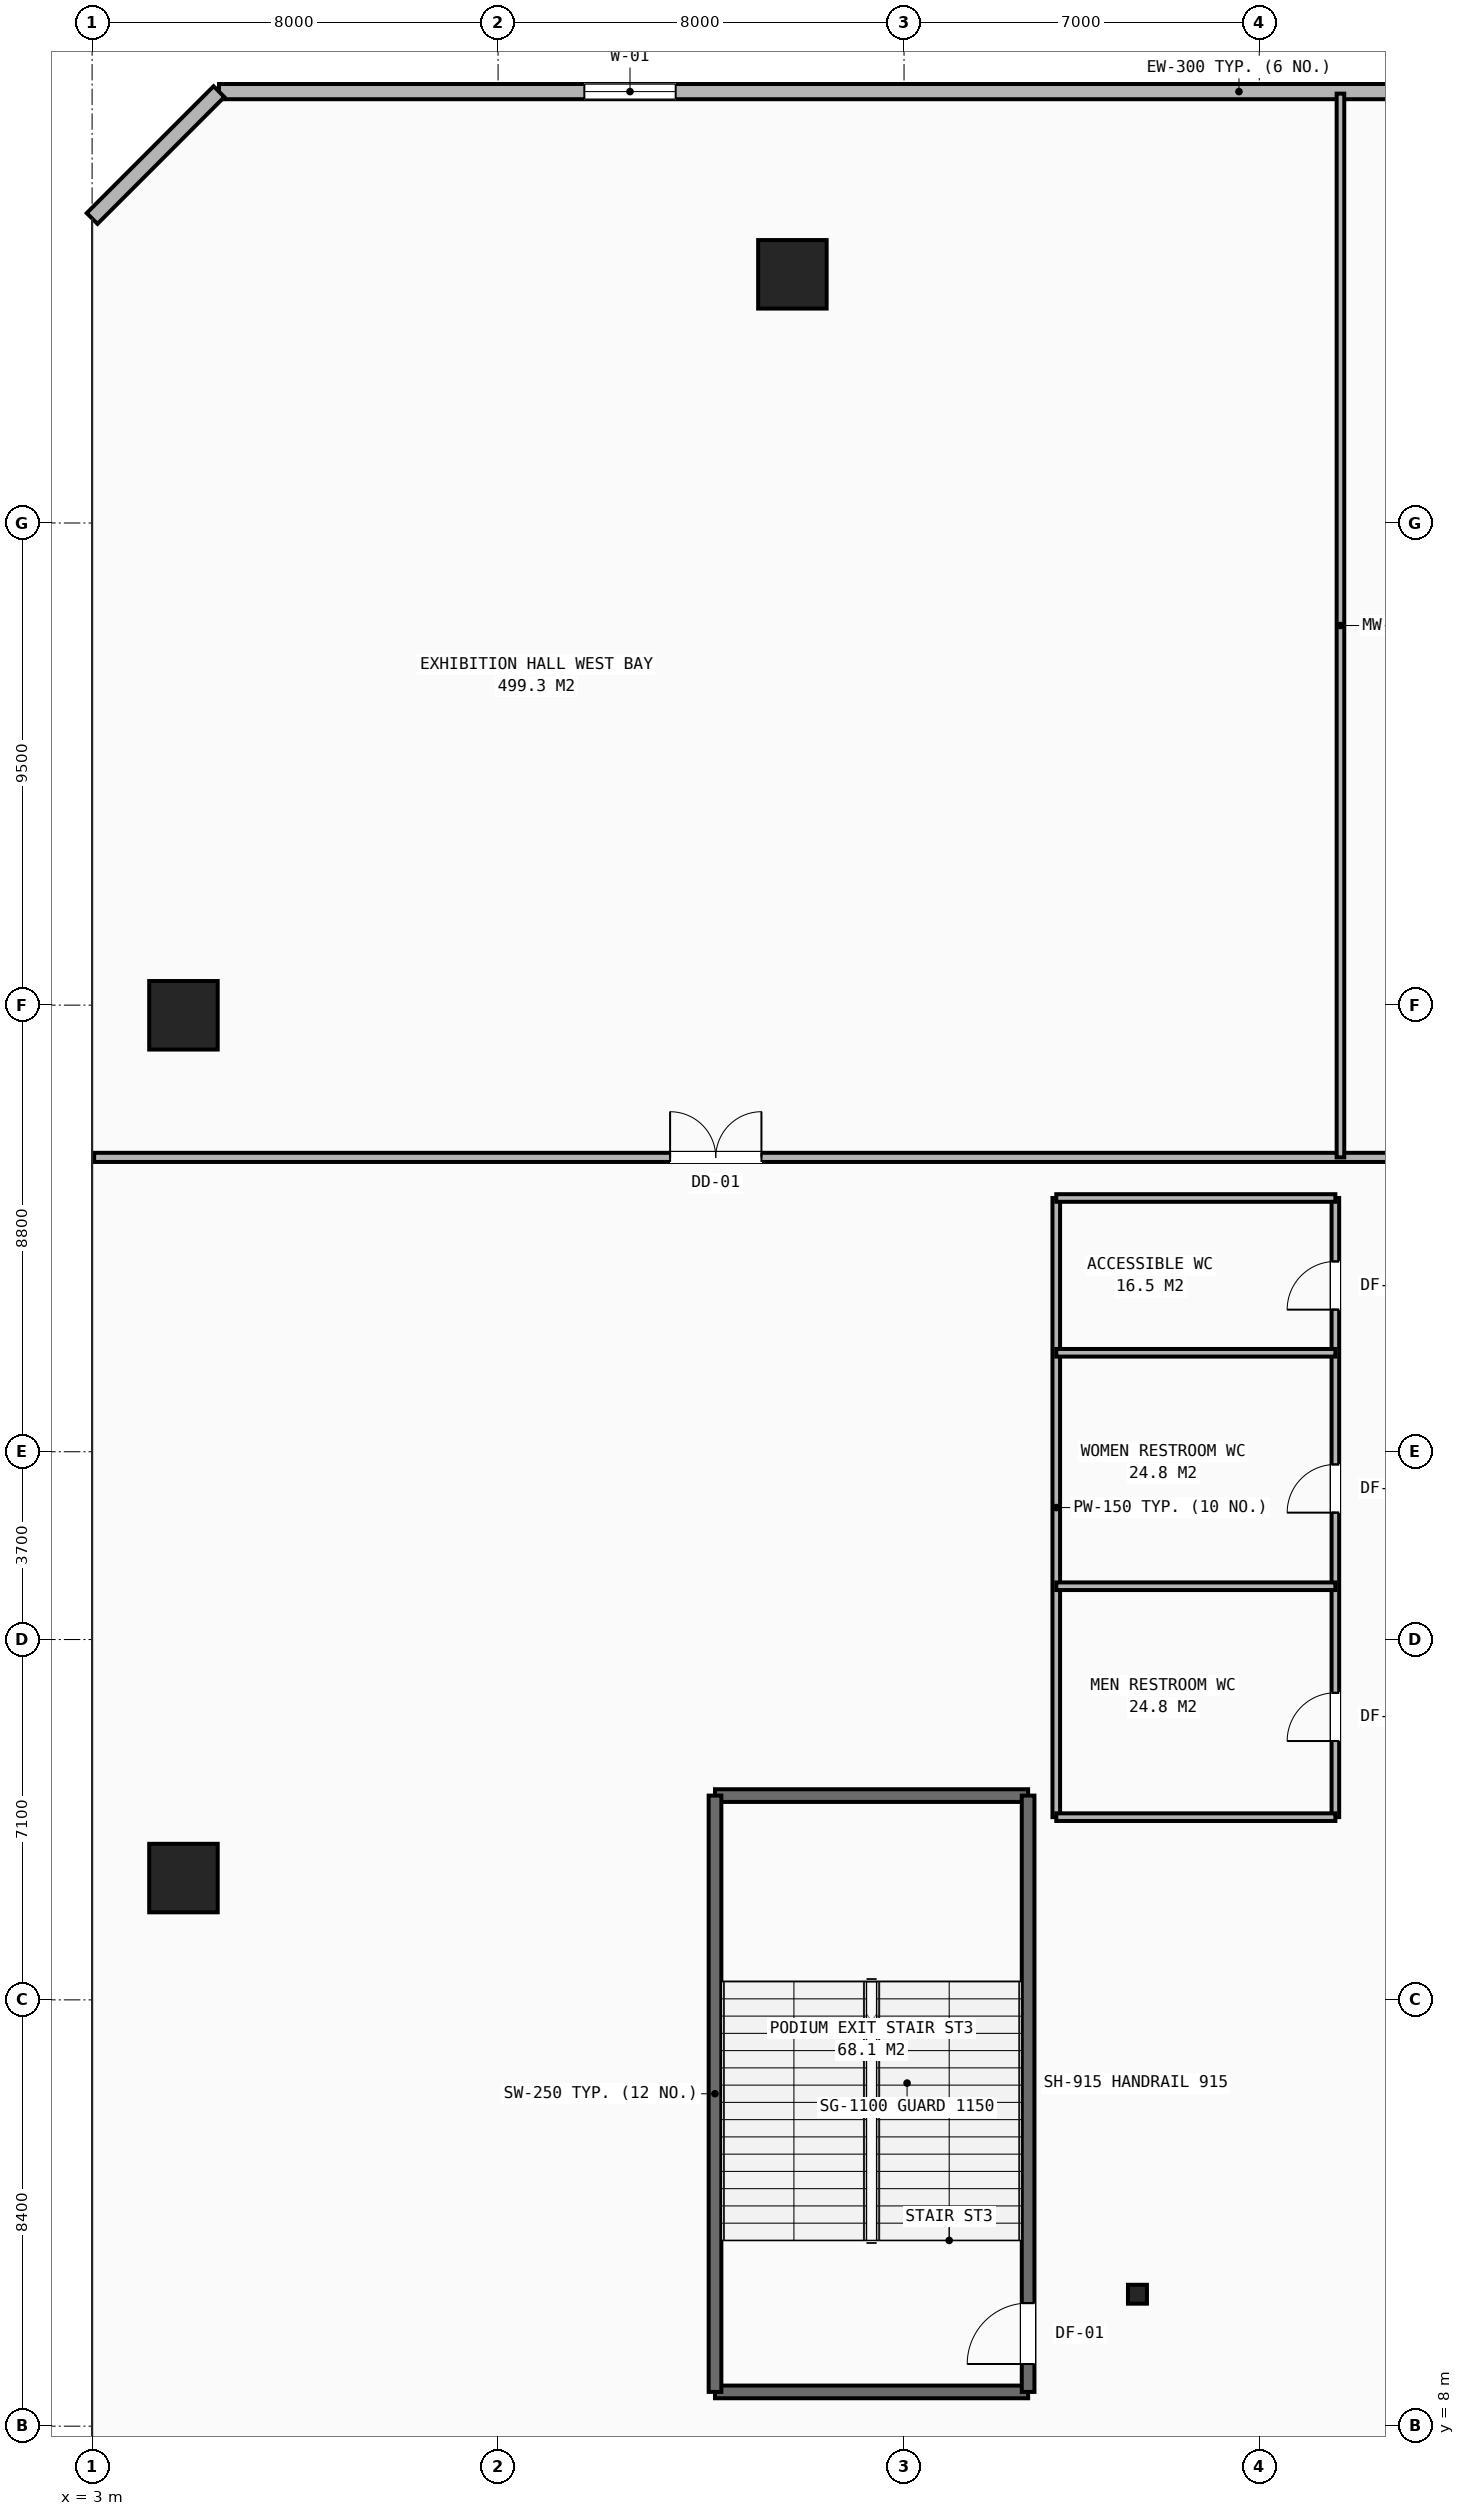
"""IFC4 building model, lengths in metres.
Left out: names, types, materials, properties, quantities, classifications, styles, units other than length and angle.
Written with IfcOpenShell. Run it as: python <this file> out.ifc"""

import sys

from ifc_helpers import new_model, si_unit, direction, frame, frame_2d, origin, origin_2d, place, context, subcontext, project, spatial, rectangle, hollow_rectangle, i_section, extrude, element, fill, save


model = new_model("IFC4")
c1 = context("Model", 3, precision=1e-05, world=origin(), true_north=direction((0.0, 1.0)))
c2 = subcontext(c1, "Body", "Model", "MODEL_VIEW")
j1 = project(units=[si_unit("LENGTHUNIT", "METRE"), si_unit("PLANEANGLEUNIT", "RADIAN")], contexts=[c1])
p1 = place(None, origin())
s1 = spatial("IfcSite", under=j1, at=p1, CompositionType="ELEMENT")
p2 = place(p1, origin())
s2 = spatial("IfcBuilding", under=s1, at=p2, CompositionType="ELEMENT")
p3 = place(p2, frame((0.0, 0.0, 11.0)))
s3 = spatial("IfcBuildingStorey", under=s2, at=p3, CompositionType="ELEMENT", Elevation=11.0)
p4 = place(p3, frame((23.6, 10.6, 0.0), z_axis=(0.0, 0.0, 1.0), x_axis=(1.0, 0.0, 0.0)))
e1 = element("IfcColumn", 1, at=p4, inside=s3, PredefinedType="COLUMN", context=c2, shape_type="SweptSolid", body=[
    extrude(i_section(OverallWidth=0.374, OverallDepth=0.372, WebThickness=0.016, FlangeThickness=0.026, at=origin_2d()), origin(), (0.0, 0.0, 1.0), 5.5),
])
for number, where, z_axis, x_axis in (
    (2, (4.8, 18.8, 0.0), (0.0, 0.0, 1.0), (1.0, 0.0, 0.0)),
    (3, (4.8, 35.8, 0.0), (0.0, 0.0, 1.0), (1.0, 0.0, 0.0)),
    (4, (16.8, 50.4, 0.0), (0.0, 0.0, 1.0), (1.0, 0.0, 0.0)),
):
    element("IfcColumn", number, at=place(p3, frame(where, z_axis=z_axis, x_axis=x_axis)), inside=s3, PredefinedType="COLUMN", context=c2, shape_type="SweptSolid", body=[
        extrude(hollow_rectangle(XDim=1.35, YDim=1.35, WallThickness=0.085, at=origin_2d()), origin(), (0.0, 0.0, 1.0), 5.5),
    ])
p5 = place(p3, frame((74.5, 54.0, 0.0), z_axis=(0.0, 0.0, 1.0), x_axis=(-1.0, 0.0, 0.0)))
e5 = element("IfcWall", 5, at=p5, inside=s3, PredefinedType="STANDARD", context=c2, shape_type="SweptSolid", body=[
    extrude(rectangle(XDim=69.0, YDim=0.3, at=frame_2d((34.5, 0.0))), origin(), (0.0, 0.0, 1.0), 5.18),
])
p6 = place(p5, frame((8.0, 0.0, 1.1)))
e6 = element("IfcOpeningElement", 6, at=p6, cuts=e5, PredefinedType="OPENING", context=c2, shape_type="SweptSolid", body=[
    extrude(rectangle(XDim=1.8, YDim=2.1, at=frame_2d((0.9, 1.05))), frame((0.0, 0.16, 0.0), z_axis=(0.0, -1.0, 0.0), x_axis=(1.0, 0.0, 0.0)), (0.0, 0.0, 1.0), 0.32),
])
p7 = place(p5, frame((16.0, 0.0, 1.1)))
e7 = element("IfcOpeningElement", 7, at=p7, cuts=e5, PredefinedType="OPENING", context=c2, shape_type="SweptSolid", body=[
    extrude(rectangle(XDim=1.8, YDim=2.1, at=frame_2d((0.9, 1.05))), frame((0.0, 0.16, 0.0), z_axis=(0.0, -1.0, 0.0), x_axis=(1.0, 0.0, 0.0)), (0.0, 0.0, 1.0), 0.32),
])
p8 = place(p5, frame((36.0, 0.0, 1.1)))
e8 = element("IfcOpeningElement", 8, at=p8, cuts=e5, PredefinedType="OPENING", context=c2, shape_type="SweptSolid", body=[
    extrude(rectangle(XDim=1.8, YDim=2.1, at=frame_2d((0.9, 1.05))), frame((0.0, 0.16, 0.0), z_axis=(0.0, -1.0, 0.0), x_axis=(1.0, 0.0, 0.0)), (0.0, 0.0, 1.0), 0.32),
])
p9 = place(p5, frame((60.0, 0.0, 1.1)))
e9 = element("IfcOpeningElement", 9, at=p9, cuts=e5, PredefinedType="OPENING", context=c2, shape_type="SweptSolid", body=[
    extrude(rectangle(XDim=1.8, YDim=2.1, at=frame_2d((0.9, 1.05))), frame((0.0, 0.16, 0.0), z_axis=(0.0, -1.0, 0.0), x_axis=(1.0, 0.0, 0.0)), (0.0, 0.0, 1.0), 0.32),
])
p10 = place(p3, frame((5.5, 54.0, 0.0), z_axis=(0.0, 0.0, 1.0), x_axis=(-0.707106781187, -0.707106781187, 0.0)))
e10 = element("IfcWall", 10, at=p10, inside=s3, PredefinedType="STANDARD", context=c2, shape_type="SweptSolid", body=[
    extrude(rectangle(XDim=3.536, YDim=0.3, at=frame_2d((1.768, 0.0))), origin(), (0.0, 0.0, 1.0), 5.18),
])
for number, where, z_axis, x_axis in (
    (11, (15.275, 20.425, 0.0), (0.0, 0.0, 1.0), (1.0, 0.0, 0.0)),
    (12, (15.275, 8.675, 0.0), (0.0, 0.0, 1.0), (1.0, 0.0, 0.0)),
):
    element("IfcWall", number, at=place(p3, frame(where, z_axis=z_axis, x_axis=x_axis)), inside=s3, PredefinedType="SHEAR", context=c2, shape_type="SweptSolid", body=[
        extrude(rectangle(XDim=6.17, YDim=0.25, at=frame_2d((3.085, 0.0))), origin(), (0.0, 0.0, 1.0), 5.18),
    ])
p11 = place(p3, frame((15.275, 8.675, 0.0), z_axis=(0.0, 0.0, 1.0), x_axis=(0.0, 1.0, 0.0)))
e13 = element("IfcWall", 13, at=p11, inside=s3, PredefinedType="SHEAR", context=c2, shape_type="SweptSolid", body=[
    extrude(rectangle(XDim=11.75, YDim=0.25, at=frame_2d((5.875, 0.0))), origin(), (0.0, 0.0, 1.0), 5.18),
])
p12 = place(p3, frame((21.445, 8.675, 0.0), z_axis=(0.0, 0.0, 1.0), x_axis=(0.0, 1.0, 0.0)))
e14 = element("IfcWall", 14, at=p12, inside=s3, PredefinedType="SHEAR", context=c2, shape_type="SweptSolid", body=[
    extrude(rectangle(XDim=11.75, YDim=0.25, at=frame_2d((5.875, 0.0))), origin(), (0.0, 0.0, 1.0), 5.18),
])
p13 = place(p12, frame((0.55, 0.0, 0.0)))
e15 = element("IfcOpeningElement", 15, at=p13, cuts=e14, PredefinedType="OPENING", context=c2, shape_type="SweptSolid", body=[
    extrude(rectangle(XDim=1.2, YDim=2.15, at=frame_2d((0.6, 1.075))), frame((0.0, 0.135, 0.0), z_axis=(0.0, -1.0, 0.0), x_axis=(1.0, 0.0, 0.0)), (0.0, 0.0, 1.0), 0.27),
])
p14 = place(p3, frame((3.04, 33.0, 0.0), z_axis=(0.0, 0.0, 1.0), x_axis=(1.0, 0.0, 0.0)))
e16 = element("IfcWall", 16, at=p14, inside=s3, PredefinedType="PARTITIONING", context=c2, shape_type="SweptSolid", body=[
    extrude(rectangle(XDim=73.92, YDim=0.18, at=frame_2d((36.96, 0.0))), origin(), (0.0, 0.0, 1.0), 4.243),
])
p15 = place(p14, frame((11.35, 0.0, 0.0)))
e17 = element("IfcOpeningElement", 17, at=p15, cuts=e16, PredefinedType="OPENING", context=c2, shape_type="SweptSolid", body=[
    extrude(rectangle(XDim=1.8, YDim=2.4, at=frame_2d((0.9, 1.2))), frame((0.0, 0.1, 0.0), z_axis=(0.0, -1.0, 0.0), x_axis=(1.0, 0.0, 0.0)), (0.0, 0.0, 1.0), 0.2),
])
p16 = place(p14, frame((35.95, 0.0, 0.0)))
e18 = element("IfcOpeningElement", 18, at=p16, cuts=e16, PredefinedType="OPENING", context=c2, shape_type="SweptSolid", body=[
    extrude(rectangle(XDim=1.8, YDim=2.4, at=frame_2d((0.9, 1.2))), frame((0.0, 0.1, 0.0), z_axis=(0.0, -1.0, 0.0), x_axis=(1.0, 0.0, 0.0)), (0.0, 0.0, 1.0), 0.2),
])
p17 = place(p14, frame((60.7, 0.0, 0.0)))
e19 = element("IfcOpeningElement", 19, at=p17, cuts=e16, PredefinedType="OPENING", context=c2, shape_type="SweptSolid", body=[
    extrude(rectangle(XDim=1.8, YDim=2.4, at=frame_2d((0.9, 1.2))), frame((0.0, 0.1, 0.0), z_axis=(0.0, -1.0, 0.0), x_axis=(1.0, 0.0, 0.0)), (0.0, 0.0, 1.0), 0.2),
])
p18 = place(p3, frame((27.6, 33.0, 0.0), z_axis=(0.0, 0.0, 1.0), x_axis=(0.0, 1.0, 0.0)))
e20 = element("IfcWall", 20, at=p18, inside=s3, PredefinedType="MOVABLE", context=c2, shape_type="SweptSolid", body=[
    extrude(rectangle(XDim=20.96, YDim=0.15, at=frame_2d((10.48, 0.0))), origin(), (0.0, 0.0, 1.0), 4.243),
])
p19 = place(p3, frame((27.5, 20.0, 0.0), z_axis=(0.0, 0.0, 1.0), x_axis=(0.0, 1.0, 0.0)))
e21 = element("IfcWall", 21, at=p19, inside=s3, PredefinedType="PARTITIONING", context=c2, shape_type="SweptSolid", body=[
    extrude(rectangle(XDim=12.2, YDim=0.15, at=frame_2d((6.1, 0.0))), origin(), (0.0, 0.0, 1.0), 4.243),
])
p20 = place(p19, frame((1.5, 0.0, 0.0)))
e22 = element("IfcOpeningElement", 22, at=p20, cuts=e21, PredefinedType="OPENING", context=c2, shape_type="SweptSolid", body=[
    extrude(rectangle(XDim=0.95, YDim=2.1, at=frame_2d((0.475, 1.05))), frame((0.0, 0.085, 0.0), z_axis=(0.0, -1.0, 0.0), x_axis=(1.0, 0.0, 0.0)), (0.0, 0.0, 1.0), 0.17),
])
p21 = place(p19, frame((6.0, 0.0, 0.0)))
e23 = element("IfcOpeningElement", 23, at=p21, cuts=e21, PredefinedType="OPENING", context=c2, shape_type="SweptSolid", body=[
    extrude(rectangle(XDim=0.95, YDim=2.1, at=frame_2d((0.475, 1.05))), frame((0.0, 0.085, 0.0), z_axis=(0.0, -1.0, 0.0), x_axis=(1.0, 0.0, 0.0)), (0.0, 0.0, 1.0), 0.17),
])
p22 = place(p19, frame((10.0, 0.0, 0.0)))
e24 = element("IfcOpeningElement", 24, at=p22, cuts=e21, PredefinedType="OPENING", context=c2, shape_type="SweptSolid", body=[
    extrude(rectangle(XDim=0.95, YDim=2.1, at=frame_2d((0.475, 1.05))), frame((0.0, 0.085, 0.0), z_axis=(0.0, -1.0, 0.0), x_axis=(1.0, 0.0, 0.0)), (0.0, 0.0, 1.0), 0.17),
])
p23 = place(p3, frame((22.0, 20.0, 0.0), z_axis=(0.0, 0.0, 1.0), x_axis=(0.0, 1.0, 0.0)))
e25 = element("IfcWall", 25, at=p23, inside=s3, PredefinedType="PARTITIONING", context=c2, shape_type="SweptSolid", body=[
    extrude(rectangle(XDim=12.2, YDim=0.15, at=frame_2d((6.1, 0.0))), origin(), (0.0, 0.0, 1.0), 5.18),
])
for number, where, z_axis, x_axis in (
    (26, (22.0, 20.0, 0.0), (0.0, 0.0, 1.0), (1.0, 0.0, 0.0)),
    (27, (22.0, 24.55, 0.0), (0.0, 0.0, 1.0), (1.0, 0.0, 0.0)),
    (28, (22.0, 29.15, 0.0), (0.0, 0.0, 1.0), (1.0, 0.0, 0.0)),
):
    element("IfcWall", number, at=place(p3, frame(where, z_axis=z_axis, x_axis=x_axis)), inside=s3, PredefinedType="PARTITIONING", context=c2, shape_type="SweptSolid", body=[
        extrude(rectangle(XDim=5.5, YDim=0.15, at=frame_2d((2.75, 0.0))), origin(), (0.0, 0.0, 1.0), 5.18),
    ])
p24 = place(p3, frame((22.0, 32.2, 0.0), z_axis=(0.0, 0.0, 1.0), x_axis=(1.0, 0.0, 0.0)))
e29 = element("IfcWall", 29, at=p24, inside=s3, PredefinedType="PARTITIONING", context=c2, shape_type="SweptSolid", body=[
    extrude(rectangle(XDim=5.5, YDim=0.15, at=frame_2d((2.75, 0.0))), origin(), (0.0, 0.0, 1.0), 4.243),
])
p25 = place(p9, origin())
e30 = element("IfcWindow", 30, at=p25, inside=s3, PartitioningType="SINGLE_PANEL", PredefinedType="WINDOW", context=c2, shape_type="SweptSolid", body=[
    extrude(rectangle(XDim=1.8, YDim=2.1, at=frame_2d((0.9, 1.05))), frame((0.0, 0.03, 0.0), z_axis=(0.0, -1.0, 0.0), x_axis=(1.0, 0.0, 0.0)), (0.0, 0.0, 1.0), 0.06),
])
fill(e9, e30)
p26 = place(p15, origin())
e31 = element("IfcDoor", 31, at=p26, inside=s3, OperationType="DOUBLE_DOOR_SINGLE_SWING", PredefinedType="DOOR", context=c2, shape_type="SweptSolid", body=[
    extrude(rectangle(XDim=1.8, YDim=2.4, at=frame_2d((0.9, 1.2))), frame((0.0, 0.025, 0.0), z_axis=(0.0, -1.0, 0.0), x_axis=(1.0, 0.0, 0.0)), (0.0, 0.0, 1.0), 0.05),
])
fill(e17, e31)
p27 = place(p20, origin())
e32 = element("IfcDoor", 32, at=p27, inside=s3, OperationType="SINGLE_SWING_LEFT", PredefinedType="DOOR", context=c2, shape_type="SweptSolid", body=[
    extrude(rectangle(XDim=0.95, YDim=2.1, at=frame_2d((0.475, 1.05))), frame((0.0, 0.025, 0.0), z_axis=(0.0, -1.0, 0.0), x_axis=(1.0, 0.0, 0.0)), (0.0, 0.0, 1.0), 0.05),
])
fill(e22, e32)
p28 = place(p21, origin())
e33 = element("IfcDoor", 33, at=p28, inside=s3, OperationType="SINGLE_SWING_LEFT", PredefinedType="DOOR", context=c2, shape_type="SweptSolid", body=[
    extrude(rectangle(XDim=0.95, YDim=2.1, at=frame_2d((0.475, 1.05))), frame((0.0, 0.025, 0.0), z_axis=(0.0, -1.0, 0.0), x_axis=(1.0, 0.0, 0.0)), (0.0, 0.0, 1.0), 0.05),
])
fill(e23, e33)
p29 = place(p22, origin())
e34 = element("IfcDoor", 34, at=p29, inside=s3, OperationType="SINGLE_SWING_LEFT", PredefinedType="DOOR", context=c2, shape_type="SweptSolid", body=[
    extrude(rectangle(XDim=0.95, YDim=2.1, at=frame_2d((0.475, 1.05))), frame((0.0, 0.025, 0.0), z_axis=(0.0, -1.0, 0.0), x_axis=(1.0, 0.0, 0.0)), (0.0, 0.0, 1.0), 0.05),
])
fill(e24, e34)
p30 = place(p13, origin())
e35 = element("IfcDoor", 35, at=p30, inside=s3, OperationType="SINGLE_SWING_LEFT", PredefinedType="DOOR", context=c2, shape_type="SweptSolid", body=[
    extrude(rectangle(XDim=1.2, YDim=2.15, at=frame_2d((0.6, 1.075))), frame((0.0, 0.025, 0.0), z_axis=(0.0, -1.0, 0.0), x_axis=(1.0, 0.0, 0.0)), (0.0, 0.0, 1.0), 0.05),
])
fill(e15, e35)
save(model, sys.argv[1])
